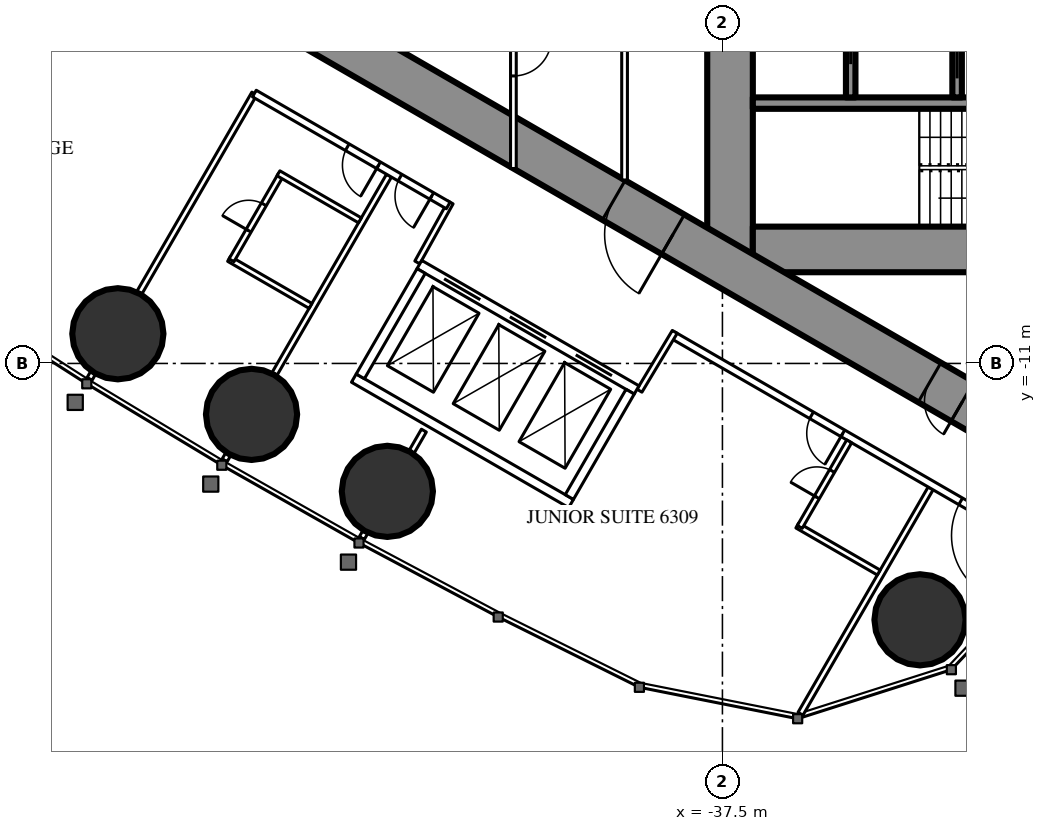
"""IFC4 building model, lengths in metres.
Left out: names, types, materials, properties, quantities, classifications, styles, units other than length and angle.
Written with IfcOpenShell. Run it as: python <this file> out.ifc"""

import sys

from ifc_helpers import new_model, si_unit, direction, frame, frame_2d, origin, origin_2d, place, context, subcontext, project, spatial, rectangle, circle, extrude, element, fill, save


model = new_model("IFC4")
c1 = context("Model", 3, precision=1e-05, world=origin(), true_north=direction((0.0, 1.0)))
c2 = subcontext(c1, "Body", "Model", "MODEL_VIEW")
j1 = project(units=[si_unit("LENGTHUNIT", "METRE"), si_unit("PLANEANGLEUNIT", "RADIAN")], contexts=[c1])
p1 = place(None, origin())
s1 = spatial("IfcSite", under=j1, at=p1, CompositionType="ELEMENT")
p2 = place(p1, origin())
s2 = spatial("IfcBuilding", under=s1, at=p2, CompositionType="ELEMENT")
p3 = place(p2, frame((0.0, 0.0, 236.9)))
s3 = spatial("IfcBuildingStorey", under=s2, at=p3, CompositionType="ELEMENT", Elevation=236.9)
for number, where, z_axis, x_axis in (
    (1, (-32.301, -17.745, 0.0), (0.0, 0.0, 1.0), (1.0, 0.0, 0.0)),
    (2, (-53.408, -10.219, 0.0), (0.0, 0.0, 1.0), (1.0, 0.0, 0.0)),
    (3, (-49.89, -12.34, 0.0), (0.0, 0.0, 1.0), (1.0, 0.0, 0.0)),
    (4, (-46.317, -14.365, 0.0), (0.0, 0.0, 1.0), (1.0, 0.0, 0.0)),
):
    element("IfcColumn", number, at=place(p3, frame(where, z_axis=z_axis, x_axis=x_axis)), inside=s3, PredefinedType="COLUMN", context=c2, shape_type="SweptSolid", body=[
        extrude(circle(Radius=1.2, at=origin_2d()), origin(), (0.0, 0.0, 1.0), 3.6),
    ])
p4 = place(p3, frame((-37.3, 8.6, 0.0), z_axis=(0.0, 0.0, 1.0), x_axis=(0.0, -1.0, 0.0)))
e5 = element("IfcWall", 5, at=p4, inside=s3, PredefinedType="SHEAR", context=c2, shape_type="SweptSolid", body=[
    extrude(rectangle(XDim=17.2, YDim=1.2, at=frame_2d((8.6, 0.0))), origin(), (0.0, 0.0, 1.0), 3.6),
])
p5 = place(p4, frame((7.7, 0.0, 0.0)))
e6 = element("IfcOpeningElement", 6, at=p5, cuts=e5, PredefinedType="OPENING", context=c2, shape_type="SweptSolid", body=[
    extrude(rectangle(XDim=1.8, YDim=2.2, at=frame_2d((0.9, 1.1))), frame((0.0, 0.61, 0.0), z_axis=(0.0, -1.0, 0.0), x_axis=(1.0, 0.0, 0.0)), (0.0, 0.0, 1.0), 1.22),
])
p6 = place(p3, frame((-28.3, -8.0, 0.0), z_axis=(0.0, 0.0, 1.0), x_axis=(-1.0, 0.0, 0.0)))
e7 = element("IfcWall", 7, at=p6, inside=s3, PredefinedType="SHEAR", context=c2, shape_type="SweptSolid", body=[
    extrude(rectangle(XDim=8.4, YDim=1.2, at=frame_2d((4.2, 0.0))), origin(), (0.0, 0.0, 1.0), 3.6),
])
p7 = place(p6, frame((0.25, 0.0, 0.0)))
e8 = element("IfcOpeningElement", 8, at=p7, cuts=e7, PredefinedType="OPENING", context=c2, shape_type="SweptSolid", body=[
    extrude(rectangle(XDim=1.0, YDim=2.2, at=frame_2d((0.5, 1.1))), frame((0.0, 0.61, 0.0), z_axis=(0.0, -1.0, 0.0), x_axis=(1.0, 0.0, 0.0)), (0.0, 0.0, 1.0), 1.22),
])
p8 = place(p3, frame((-28.3, -4.15, 0.0), z_axis=(0.0, 0.0, 1.0), x_axis=(-1.0, 0.0, 0.0)))
e9 = element("IfcWall", 9, at=p8, inside=s3, PredefinedType="SHEAR", context=c2, shape_type="SweptSolid", body=[
    extrude(rectangle(XDim=8.4, YDim=0.3, at=frame_2d((4.2, 0.0))), origin(), (0.0, 0.0, 1.0), 3.6),
])
p9 = place(p3, frame((-31.325, -1.9, 0.0), z_axis=(0.0, 0.0, 1.0), x_axis=(0.0, -1.0, 0.0)))
e10 = element("IfcWall", 10, at=p9, inside=s3, PredefinedType="SHEAR", context=c2, shape_type="SweptSolid", body=[
    extrude(rectangle(XDim=2.1, YDim=0.25, at=frame_2d((1.05, 0.0))), origin(), (0.0, 0.0, 1.0), 3.6),
])
p10 = place(p9, frame((0.5, 0.0, 0.0)))
e11 = element("IfcOpeningElement", 11, at=p10, cuts=e10, PredefinedType="OPENING", context=c2, shape_type="SweptSolid", body=[
    extrude(rectangle(XDim=1.1, YDim=2.2, at=frame_2d((0.55, 1.1))), frame((0.0, 0.135, 0.0), z_axis=(0.0, -1.0, 0.0), x_axis=(1.0, 0.0, 0.0)), (0.0, 0.0, 1.0), 0.27),
])
p11 = place(p3, frame((-34.125, -1.65, 0.0), z_axis=(0.0, 0.0, 1.0), x_axis=(0.0, -1.0, 0.0)))
e12 = element("IfcWall", 12, at=p11, inside=s3, PredefinedType="SHEAR", context=c2, shape_type="SweptSolid", body=[
    extrude(rectangle(XDim=2.35, YDim=0.25, at=frame_2d((1.175, 0.0))), origin(), (0.0, 0.0, 1.0), 3.6),
])
p12 = place(p11, frame((0.875, 0.0, 0.0)))
e13 = element("IfcOpeningElement", 13, at=p12, cuts=e12, PredefinedType="OPENING", context=c2, shape_type="SweptSolid", body=[
    extrude(rectangle(XDim=0.6, YDim=2.0, at=frame_2d((0.3, 1.0))), frame((0.0, 0.135, 0.0), z_axis=(0.0, -1.0, 0.0), x_axis=(1.0, 0.0, 0.0)), (0.0, 0.0, 1.0), 0.27),
])
p13 = place(p3, frame((-27.2, -14.3, 0.0), z_axis=(0.0, 0.0, 1.0), x_axis=(-0.866024021859, 0.500002393557, 0.0)))
e14 = element("IfcWall", 14, at=p13, inside=s3, PredefinedType="SHEAR", context=c2, shape_type="SweptSolid", body=[
    extrude(rectangle(XDim=27.907, YDim=1.2, at=frame_2d((13.954, 0.0))), origin(), (0.0, 0.0, 1.0), 3.6),
])
p14 = place(p13, frame((4.6, 0.0, 0.0)))
e15 = element("IfcOpeningElement", 15, at=p14, cuts=e14, PredefinedType="OPENING", context=c2, shape_type="SweptSolid", body=[
    extrude(rectangle(XDim=1.0, YDim=2.2, at=frame_2d((0.5, 1.1))), frame((0.0, 0.61, 0.0), z_axis=(0.0, -1.0, 0.0), x_axis=(1.0, 0.0, 0.0)), (0.0, 0.0, 1.0), 1.22),
])
p15 = place(p13, frame((13.395, 0.0, 0.0)))
e16 = element("IfcOpeningElement", 16, at=p15, cuts=e14, PredefinedType="OPENING", context=c2, shape_type="SweptSolid", body=[
    extrude(rectangle(XDim=1.8, YDim=2.2, at=frame_2d((0.9, 1.1))), frame((0.0, 0.61, 0.0), z_axis=(0.0, -1.0, 0.0), x_axis=(1.0, 0.0, 0.0)), (0.0, 0.0, 1.0), 1.22),
])
p16 = place(p3, frame((-32.022, -14.287, 0.0), z_axis=(0.0, 0.0, 1.0), x_axis=(-0.50000019414, -0.866025291697, 0.0)))
e17 = element("IfcWall", 17, at=p16, inside=s3, PredefinedType="PARTITIONING", context=c2, shape_type="SweptSolid", body=[
    extrude(rectangle(XDim=6.848, YDim=0.15, at=frame_2d((3.424, 0.0))), origin(), (0.0, 0.0, 1.0), 3.35),
])
p17 = place(p3, frame((-46.898, -15.439, 0.0), z_axis=(0.0, 0.0, 1.0), x_axis=(-0.500232303069, -0.865891241997, 0.0)))
e18 = element("IfcWall", 18, at=p17, inside=s3, PredefinedType="PARTITIONING", context=c2, shape_type="SweptSolid", body=[
    extrude(rectangle(XDim=0.18, YDim=0.15, at=frame_2d((0.09, 0.0))), origin(), (0.0, 0.0, 1.0), 2.45),
])
p18 = place(p3, frame((-46.274, -6.059, 0.0), z_axis=(0.0, 0.0, 1.0), x_axis=(-0.500020471368, -0.866013584312, 0.0)))
e19 = element("IfcWall", 19, at=p18, inside=s3, PredefinedType="PARTITIONING", context=c2, shape_type="SweptSolid", body=[
    extrude(rectangle(XDim=6.028, YDim=0.15, at=frame_2d((3.014, 0.0))), origin(), (0.0, 0.0, 1.0), 2.45),
])
p19 = place(p3, frame((-50.508, -13.392, 0.0), z_axis=(0.0, 0.0, 1.0), x_axis=(-0.499644091975, -0.866230789891, 0.0)))
e20 = element("IfcWall", 20, at=p19, inside=s3, PredefinedType="PARTITIONING", context=c2, shape_type="SweptSolid", body=[
    extrude(rectangle(XDim=0.18, YDim=0.15, at=frame_2d((0.09, 0.0))), origin(), (0.0, 0.0, 1.0), 2.45),
])
p20 = place(p3, frame((-49.816, -3.898, 0.0), z_axis=(0.0, 0.0, 1.0), x_axis=(-0.500001913541, -0.866024298998, 0.0)))
e21 = element("IfcWall", 21, at=p20, inside=s3, PredefinedType="PARTITIONING", context=c2, shape_type="SweptSolid", body=[
    extrude(rectangle(XDim=6.05, YDim=0.15, at=frame_2d((3.025, 0.0))), origin(), (0.0, 0.0, 1.0), 2.45),
])
p21 = place(p3, frame((-54.061, -11.25, 0.0), z_axis=(0.0, 0.0, 1.0), x_axis=(-0.500391173478, -0.865799441849, 0.0)))
e22 = element("IfcWall", 22, at=p21, inside=s3, PredefinedType="PARTITIONING", context=c2, shape_type="SweptSolid", body=[
    extrude(rectangle(XDim=0.179, YDim=0.15, at=frame_2d((0.089, 0.0))), origin(), (0.0, 0.0, 1.0), 2.45),
])
p22 = place(p3, frame((-45.356, -12.767, 0.0), z_axis=(0.0, 0.0, 1.0), x_axis=(-0.499886366516, -0.866091000168, 0.0)))
e23 = element("IfcWall", 23, at=p22, inside=s3, PredefinedType="PARTITIONING", context=c2, shape_type="SweptSolid", body=[
    extrude(rectangle(XDim=0.645, YDim=0.15, at=frame_2d((0.322, 0.0))), origin(), (0.0, 0.0, 1.0), 3.35),
])
p23 = place(p3, frame((-28.737, -16.068, 0.0), z_axis=(0.0, 0.0, 1.0), x_axis=(-0.866029399323, 0.49999307946, 0.0)))
e24 = element("IfcWall", 24, at=p23, inside=s3, PredefinedType="PARTITIONING", context=c2, shape_type="SweptSolid", body=[
    extrude(rectangle(XDim=11.61, YDim=0.2, at=frame_2d((5.805, 0.0))), origin(), (0.0, 0.0, 1.0), 3.35),
])
p24 = place(p23, frame((1.08, 0.0, 0.0)))
e25 = element("IfcOpeningElement", 25, at=p24, cuts=e24, PredefinedType="OPENING", context=c2, shape_type="SweptSolid", body=[
    extrude(rectangle(XDim=1.8, YDim=2.03, at=frame_2d((0.9, 1.015))), frame((0.0, 0.11, 0.0), z_axis=(0.0, -1.0, 0.0), x_axis=(1.0, 0.0, 0.0)), (0.0, 0.0, 1.0), 0.22),
])
p25 = place(p23, frame((6.46, 0.0, 0.0)))
e26 = element("IfcOpeningElement", 26, at=p25, cuts=e24, PredefinedType="OPENING", context=c2, shape_type="SweptSolid", body=[
    extrude(rectangle(XDim=0.95, YDim=2.2, at=frame_2d((0.475, 1.1))), frame((0.0, 0.11, 0.0), z_axis=(0.0, -1.0, 0.0), x_axis=(1.0, 0.0, 0.0)), (0.0, 0.0, 1.0), 0.22),
])
for number, where, z_axis, x_axis in (
    (27, (-39.683, -11.718, 0.0), (0.0, 0.0, 1.0), (0.514, 0.858, 0.0)),
    (28, (-44.652, -6.764, 0.0), (0.0, 0.0, 1.0), (-0.485, -0.874, 0.0)),
):
    element("IfcWall", number, at=place(p3, frame(where, z_axis=z_axis, x_axis=x_axis)), inside=s3, PredefinedType="PARTITIONING", context=c2, shape_type="SweptSolid", body=[
        extrude(rectangle(XDim=1.805, YDim=0.15, at=frame_2d((0.903, 0.0))), origin(), (0.0, 0.0, 1.0), 3.35),
    ])
p26 = place(p3, frame((-48.339, -9.486, 0.0), z_axis=(0.0, 0.0, 1.0), x_axis=(-0.866006523861, 0.500032699561, 0.0)))
e29 = element("IfcWall", 29, at=p26, inside=s3, PredefinedType="PARTITIONING", context=c2, shape_type="SweptSolid", body=[
    extrude(rectangle(XDim=2.475, YDim=0.15, at=frame_2d((1.237, 0.0))), origin(), (0.0, 0.0, 1.0), 3.35),
])
p27 = place(p3, frame((-49.117, -6.034, 0.0), z_axis=(0.0, 0.0, 1.0), x_axis=(-0.500006934395, -0.866021400173, 0.0)))
e30 = element("IfcWall", 30, at=p27, inside=s3, PredefinedType="PARTITIONING", context=c2, shape_type="SweptSolid", body=[
    extrude(rectangle(XDim=2.6, YDim=0.15, at=frame_2d((1.3, 0.0))), origin(), (0.0, 0.0, 1.0), 3.35),
])
p28 = place(p27, frame((0.9, 0.0, 0.0)))
e31 = element("IfcOpeningElement", 31, at=p28, cuts=e30, PredefinedType="OPENING", context=c2, shape_type="SweptSolid", body=[
    extrude(rectangle(XDim=0.8, YDim=2.2, at=frame_2d((0.4, 1.1))), frame((0.0, 0.085, 0.0), z_axis=(0.0, -1.0, 0.0), x_axis=(1.0, 0.0, 0.0)), (0.0, 0.0, 1.0), 0.17),
])
p29 = place(p3, frame((-47.039, -7.234, 0.0), z_axis=(0.0, 0.0, 1.0), x_axis=(-0.866073894602, 0.499916002032, 0.0)))
e32 = element("IfcWall", 32, at=p29, inside=s3, PredefinedType="PARTITIONING", context=c2, shape_type="SweptSolid", body=[
    extrude(rectangle(XDim=2.475, YDim=0.15, at=frame_2d((1.238, 0.0))), origin(), (0.0, 0.0, 1.0), 2.5),
])
p30 = place(p3, frame((-33.387, -16.502, 0.0), z_axis=(0.0, 0.0, 1.0), x_axis=(-0.866006523861, 0.500032699561, 0.0)))
e33 = element("IfcWall", 33, at=p30, inside=s3, PredefinedType="PARTITIONING", context=c2, shape_type="SweptSolid", body=[
    extrude(rectangle(XDim=2.475, YDim=0.15, at=frame_2d((1.237, 0.0))), origin(), (0.0, 0.0, 1.0), 3.35),
])
p31 = place(p3, frame((-34.165, -13.05, 0.0), z_axis=(0.0, 0.0, 1.0), x_axis=(-0.500047596559, -0.865997922154, 0.0)))
e34 = element("IfcWall", 34, at=p31, inside=s3, PredefinedType="PARTITIONING", context=c2, shape_type="SweptSolid", body=[
    extrude(rectangle(XDim=2.6, YDim=0.15, at=frame_2d((1.3, 0.0))), origin(), (0.0, 0.0, 1.0), 3.35),
])
p32 = place(p31, frame((0.9, 0.0, 0.0)))
e35 = element("IfcOpeningElement", 35, at=p32, cuts=e34, PredefinedType="OPENING", context=c2, shape_type="SweptSolid", body=[
    extrude(rectangle(XDim=0.8, YDim=2.2, at=frame_2d((0.4, 1.1))), frame((0.0, 0.085, 0.0), z_axis=(0.0, -1.0, 0.0), x_axis=(1.0, 0.0, 0.0)), (0.0, 0.0, 1.0), 0.17),
])
p33 = place(p3, frame((-44.715, -6.844, 0.0), z_axis=(0.0, 0.0, 1.0), x_axis=(-0.866020627653, 0.50000827241, 0.0)))
e36 = element("IfcWall", 36, at=p33, inside=s3, PredefinedType="PARTITIONING", context=c2, shape_type="SweptSolid", body=[
    extrude(rectangle(XDim=5.891, YDim=0.2, at=frame_2d((2.945, 0.0))), origin(), (0.0, 0.0, 1.0), 3.35),
])
p34 = place(p33, frame((2.117, 0.0, 0.0)))
e37 = element("IfcOpeningElement", 37, at=p34, cuts=e36, PredefinedType="OPENING", context=c2, shape_type="SweptSolid", body=[
    extrude(rectangle(XDim=0.95, YDim=2.2, at=frame_2d((0.475, 1.1))), frame((0.0, 0.11, 0.0), z_axis=(0.0, -1.0, 0.0), x_axis=(1.0, 0.0, 0.0)), (0.0, 0.0, 1.0), 0.22),
])
p35 = place(p33, frame((0.5, 0.0, 0.0)))
e38 = element("IfcOpeningElement", 38, at=p35, cuts=e36, PredefinedType="OPENING", context=c2, shape_type="SweptSolid", body=[
    extrude(rectangle(XDim=0.967, YDim=2.2, at=frame_2d((0.483, 1.1))), frame((0.0, 0.11, 0.0), z_axis=(0.0, -1.0, 0.0), x_axis=(1.0, 0.0, 0.0)), (0.0, 0.0, 1.0), 0.22),
])
p36 = place(p3, frame((-40.075, 6.174, 0.0), z_axis=(0.0, 0.0, 1.0), x_axis=(0.0, -1.0, 0.0)))
e39 = element("IfcWall", 39, at=p36, inside=s3, PredefinedType="PARTITIONING", context=c2, shape_type="SweptSolid", body=[
    extrude(rectangle(XDim=12.348, YDim=0.15, at=frame_2d((6.174, 0.0))), origin(), (0.0, 0.0, 1.0), 3.35),
])
p37 = place(p36, frame((5.274, 0.0, 0.0)))
e40 = element("IfcOpeningElement", 40, at=p37, cuts=e39, PredefinedType="OPENING", context=c2, shape_type="SweptSolid", body=[
    extrude(rectangle(XDim=1.8, YDim=2.2, at=frame_2d((0.9, 1.1))), frame((0.0, 0.085, 0.0), z_axis=(0.0, -1.0, 0.0), x_axis=(1.0, 0.0, 0.0)), (0.0, 0.0, 1.0), 0.17),
])
p38 = place(p3, frame((-43.0, 5.871, 0.0), z_axis=(0.0, 0.0, 1.0), x_axis=(0.0, -1.0, 0.0)))
e41 = element("IfcWall", 41, at=p38, inside=s3, PredefinedType="PARTITIONING", context=c2, shape_type="SweptSolid", body=[
    extrude(rectangle(XDim=11.741, YDim=0.15, at=frame_2d((5.871, 0.0))), origin(), (0.0, 0.0, 1.0), 3.35),
])
p39 = place(p38, frame((2.435, 0.0, 0.0)))
e42 = element("IfcOpeningElement", 42, at=p39, cuts=e41, PredefinedType="OPENING", context=c2, shape_type="SweptSolid", body=[
    extrude(rectangle(XDim=1.0, YDim=2.2, at=frame_2d((0.5, 1.1))), frame((0.0, 0.085, 0.0), z_axis=(0.0, -1.0, 0.0), x_axis=(1.0, 0.0, 0.0)), (0.0, 0.0, 1.0), 0.17),
])
p40 = place(p38, frame((8.306, 0.0, 0.0)))
e43 = element("IfcOpeningElement", 43, at=p40, cuts=e41, PredefinedType="OPENING", context=c2, shape_type="SweptSolid", body=[
    extrude(rectangle(XDim=1.0, YDim=2.2, at=frame_2d((0.5, 1.1))), frame((0.0, 0.085, 0.0), z_axis=(0.0, -1.0, 0.0), x_axis=(1.0, 0.0, 0.0)), (0.0, 0.0, 1.0), 0.17),
])
p41 = place(p3, frame((-39.758, -11.697, 0.0), z_axis=(0.0, 0.0, 1.0), x_axis=(-0.866024194504, 0.500002094529, 0.0)))
e44 = element("IfcWall", 44, at=p41, inside=s3, PredefinedType="PARTITIONING", context=c2, shape_type="SweptSolid", body=[
    extrude(rectangle(XDim=6.6, YDim=0.25, at=frame_2d((3.3, 0.0))), origin(), (0.0, 0.0, 1.0), 3.35),
])
p42 = place(p41, frame((0.75, 0.0, 0.0)))
e45 = element("IfcOpeningElement", 45, at=p42, cuts=e44, PredefinedType="OPENING", context=c2, shape_type="SweptSolid", body=[
    extrude(rectangle(XDim=1.1, YDim=2.2, at=frame_2d((0.55, 1.1))), frame((0.0, 0.135, 0.0), z_axis=(0.0, -1.0, 0.0), x_axis=(1.0, 0.0, 0.0)), (0.0, 0.0, 1.0), 0.27),
])
p43 = place(p41, frame((2.75, 0.0, 0.0)))
e46 = element("IfcOpeningElement", 46, at=p43, cuts=e44, PredefinedType="OPENING", context=c2, shape_type="SweptSolid", body=[
    extrude(rectangle(XDim=1.1, YDim=2.2, at=frame_2d((0.55, 1.1))), frame((0.0, 0.135, 0.0), z_axis=(0.0, -1.0, 0.0), x_axis=(1.0, 0.0, 0.0)), (0.0, 0.0, 1.0), 0.27),
])
p44 = place(p41, frame((4.75, 0.0, 0.0)))
e47 = element("IfcOpeningElement", 47, at=p44, cuts=e44, PredefinedType="OPENING", context=c2, shape_type="SweptSolid", body=[
    extrude(rectangle(XDim=1.1, YDim=2.2, at=frame_2d((0.55, 1.1))), frame((0.0, 0.135, 0.0), z_axis=(0.0, -1.0, 0.0), x_axis=(1.0, 0.0, 0.0)), (0.0, 0.0, 1.0), 0.27),
])
p45 = place(p3, frame((-41.482, -14.686, 0.0), z_axis=(0.0, 0.0, 1.0), x_axis=(-0.86603344179, 0.499986077507, 0.0)))
e48 = element("IfcWall", 48, at=p45, inside=s3, PredefinedType="PARTITIONING", context=c2, shape_type="SweptSolid", body=[
    extrude(rectangle(XDim=6.6, YDim=0.25, at=frame_2d((3.3, 0.0))), origin(), (0.0, 0.0, 1.0), 3.35),
])
for number, where, z_axis, x_axis in (
    (49, (-39.928, -11.743, 0.0), (0.0, 0.0, 1.0), (-0.5, -0.866, 0.0)),
    (50, (-45.428, -8.568, 0.0), (0.0, 0.0, 1.0), (-0.5, -0.866, 0.0)),
):
    element("IfcWall", number, at=place(p3, frame(where, z_axis=z_axis, x_axis=x_axis)), inside=s3, PredefinedType="PARTITIONING", context=c2, shape_type="SweptSolid", body=[
        extrude(rectangle(XDim=3.201, YDim=0.25, at=frame_2d((1.6, 0.0))), origin(), (0.0, 0.0, 1.0), 3.35),
    ])
p46 = place(p28, origin())
e51 = element("IfcDoor", 51, at=p46, inside=s3, OperationType="SINGLE_SWING_RIGHT", PredefinedType="DOOR", context=c2, shape_type="SweptSolid", body=[
    extrude(rectangle(XDim=0.8, YDim=2.2, at=frame_2d((0.4, 1.1))), frame((0.0, 0.025, 0.0), z_axis=(0.0, -1.0, 0.0), x_axis=(1.0, 0.0, 0.0)), (0.0, 0.0, 1.0), 0.05),
])
fill(e31, e51)
p47 = place(p34, origin())
e52 = element("IfcDoor", 52, at=p47, inside=s3, OperationType="SINGLE_SWING_LEFT", PredefinedType="DOOR", context=c2, shape_type="SweptSolid", body=[
    extrude(rectangle(XDim=0.95, YDim=2.2, at=frame_2d((0.475, 1.1))), frame((0.0, 0.025, 0.0), z_axis=(0.0, -1.0, 0.0), x_axis=(1.0, 0.0, 0.0)), (0.0, 0.0, 1.0), 0.05),
])
fill(e37, e52)
p48 = place(p24, origin())
e53 = element("IfcDoor", 53, at=p48, inside=s3, OperationType="DOUBLE_DOOR_SINGLE_SWING", PredefinedType="DOOR", context=c2, shape_type="SweptSolid", body=[
    extrude(rectangle(XDim=1.8, YDim=2.03, at=frame_2d((0.9, 1.015))), frame((0.0, 0.025, 0.0), z_axis=(0.0, -1.0, 0.0), x_axis=(1.0, 0.0, 0.0)), (0.0, 0.0, 1.0), 0.05),
])
fill(e25, e53)
p49 = place(p32, origin())
e54 = element("IfcDoor", 54, at=p49, inside=s3, OperationType="SINGLE_SWING_RIGHT", PredefinedType="DOOR", context=c2, shape_type="SweptSolid", body=[
    extrude(rectangle(XDim=0.8, YDim=2.2, at=frame_2d((0.4, 1.1))), frame((0.0, 0.025, 0.0), z_axis=(0.0, -1.0, 0.0), x_axis=(1.0, 0.0, 0.0)), (0.0, 0.0, 1.0), 0.05),
])
fill(e35, e54)
p50 = place(p25, origin())
e55 = element("IfcDoor", 55, at=p50, inside=s3, OperationType="SINGLE_SWING_LEFT", PredefinedType="DOOR", context=c2, shape_type="SweptSolid", body=[
    extrude(rectangle(XDim=0.95, YDim=2.2, at=frame_2d((0.475, 1.1))), frame((0.0, 0.025, 0.0), z_axis=(0.0, -1.0, 0.0), x_axis=(1.0, 0.0, 0.0)), (0.0, 0.0, 1.0), 0.05),
])
fill(e26, e55)
p51 = place(p35, origin())
e56 = element("IfcDoor", 56, at=p51, inside=s3, OperationType="SINGLE_SWING_LEFT", PredefinedType="DOOR", context=c2, shape_type="SweptSolid", body=[
    extrude(rectangle(XDim=0.967, YDim=2.2, at=frame_2d((0.483, 1.1))), frame((0.0, 0.025, 0.0), z_axis=(0.0, -1.0, 0.0), x_axis=(1.0, 0.0, 0.0)), (0.0, 0.0, 1.0), 0.05),
])
fill(e38, e56)
p52 = place(p40, origin())
e57 = element("IfcDoor", 57, at=p52, inside=s3, OperationType="SINGLE_SWING_LEFT", PredefinedType="DOOR", context=c2, shape_type="SweptSolid", body=[
    extrude(rectangle(XDim=1.0, YDim=2.2, at=frame_2d((0.5, 1.1))), frame((0.0, 0.025, 0.0), z_axis=(0.0, -1.0, 0.0), x_axis=(1.0, 0.0, 0.0)), (0.0, 0.0, 1.0), 0.05),
])
fill(e43, e57)
p53 = place(p14, origin())
e58 = element("IfcDoor", 58, at=p53, inside=s3, OperationType="SINGLE_SWING_LEFT", PredefinedType="DOOR", context=c2, shape_type="SweptSolid", body=[
    extrude(rectangle(XDim=1.0, YDim=2.2, at=frame_2d((0.5, 1.1))), frame((0.0, 0.025, 0.0), z_axis=(0.0, -1.0, 0.0), x_axis=(1.0, 0.0, 0.0)), (0.0, 0.0, 1.0), 0.05),
])
fill(e15, e58)
p54 = place(p15, origin())
e59 = element("IfcDoor", 59, at=p54, inside=s3, OperationType="DOUBLE_DOOR_SINGLE_SWING", PredefinedType="DOOR", context=c2, shape_type="SweptSolid", body=[
    extrude(rectangle(XDim=1.8, YDim=2.2, at=frame_2d((0.9, 1.1))), frame((0.0, 0.025, 0.0), z_axis=(0.0, -1.0, 0.0), x_axis=(1.0, 0.0, 0.0)), (0.0, 0.0, 1.0), 0.05),
])
fill(e16, e59)
p55 = place(p10, origin())
e60 = element("IfcDoor", 60, at=p55, inside=s3, OperationType="SLIDING_TO_LEFT", PredefinedType="USERDEFINED", context=c2, shape_type="SweptSolid", body=[
    extrude(rectangle(XDim=1.1, YDim=2.2, at=frame_2d((0.55, 1.1))), frame((0.0, 0.025, 0.0), z_axis=(0.0, -1.0, 0.0), x_axis=(1.0, 0.0, 0.0)), (0.0, 0.0, 1.0), 0.05),
])
fill(e11, e60)
p56 = place(p12, origin())
e61 = element("IfcDoor", 61, at=p56, inside=s3, OperationType="SLIDING_TO_LEFT", PredefinedType="DOOR", context=c2, shape_type="SweptSolid", body=[
    extrude(rectangle(XDim=0.6, YDim=2.0, at=frame_2d((0.3, 1.0))), frame((0.0, 0.025, 0.0), z_axis=(0.0, -1.0, 0.0), x_axis=(1.0, 0.0, 0.0)), (0.0, 0.0, 1.0), 0.05),
])
fill(e13, e61)
p57 = place(p42, origin())
e62 = element("IfcDoor", 62, at=p57, inside=s3, OperationType="DOUBLE_DOOR_SLIDING", PredefinedType="USERDEFINED", context=c2, shape_type="SweptSolid", body=[
    extrude(rectangle(XDim=1.1, YDim=2.2, at=frame_2d((0.55, 1.1))), frame((0.0, 0.025, 0.0), z_axis=(0.0, -1.0, 0.0), x_axis=(1.0, 0.0, 0.0)), (0.0, 0.0, 1.0), 0.05),
])
fill(e45, e62)
p58 = place(p43, origin())
e63 = element("IfcDoor", 63, at=p58, inside=s3, OperationType="DOUBLE_DOOR_SLIDING", PredefinedType="USERDEFINED", context=c2, shape_type="SweptSolid", body=[
    extrude(rectangle(XDim=1.1, YDim=2.2, at=frame_2d((0.55, 1.1))), frame((0.0, 0.025, 0.0), z_axis=(0.0, -1.0, 0.0), x_axis=(1.0, 0.0, 0.0)), (0.0, 0.0, 1.0), 0.05),
])
fill(e46, e63)
p59 = place(p44, origin())
e64 = element("IfcDoor", 64, at=p59, inside=s3, OperationType="DOUBLE_DOOR_SLIDING", PredefinedType="USERDEFINED", context=c2, shape_type="SweptSolid", body=[
    extrude(rectangle(XDim=1.1, YDim=2.2, at=frame_2d((0.55, 1.1))), frame((0.0, 0.025, 0.0), z_axis=(0.0, -1.0, 0.0), x_axis=(1.0, 0.0, 0.0)), (0.0, 0.0, 1.0), 0.05),
])
fill(e47, e64)
save(model, sys.argv[1])
